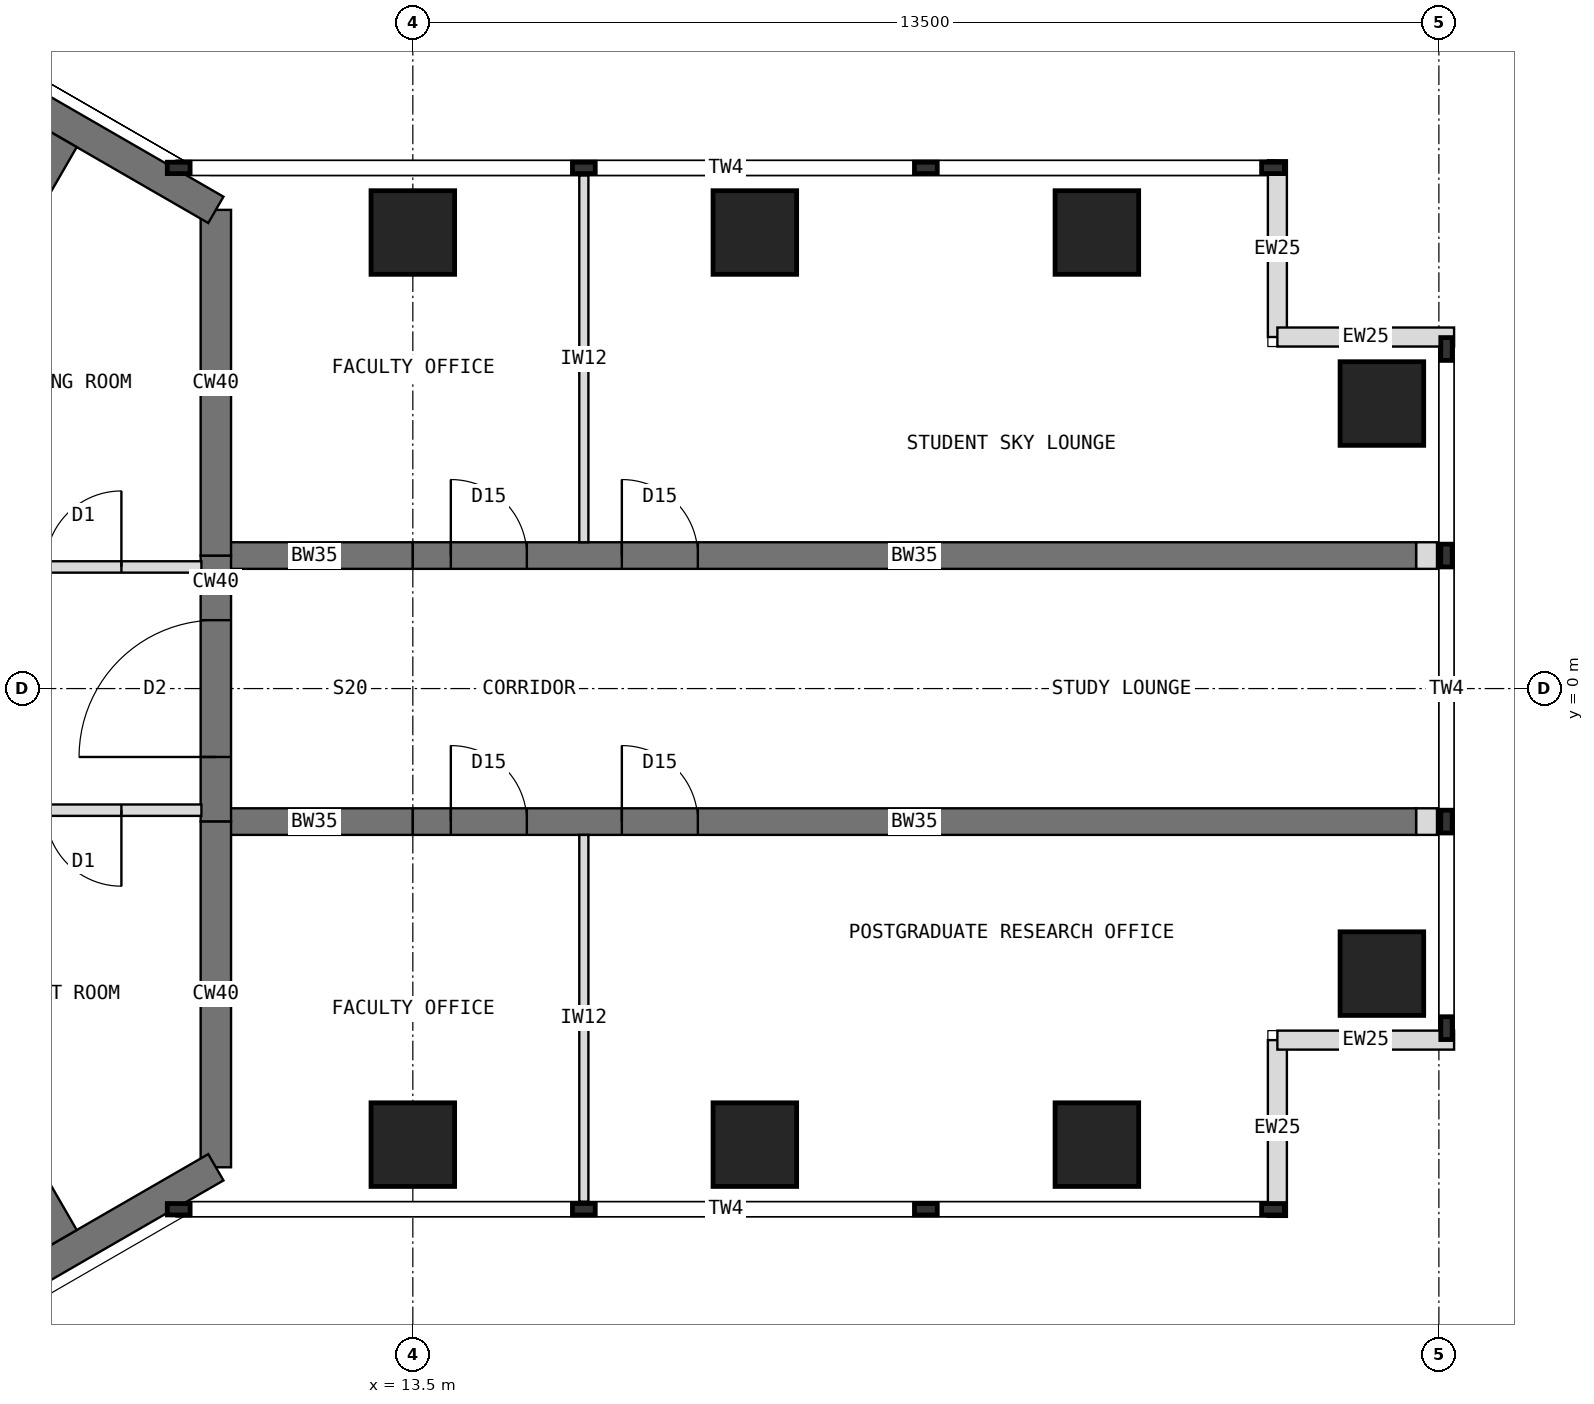
"""IFC4 building model, lengths in metres.
Left out: names, types, materials, properties, quantities, classifications, styles, units other than length and angle.
Written with IfcOpenShell. Run it as: python <this file> out.ifc"""

import sys

from ifc_helpers import new_model, si_unit, direction, frame, frame_2d, origin, origin_2d, place, context, subcontext, project, spatial, rectangle, extrude, element, fill, save


model = new_model("IFC4")
c1 = context("Model", 3, precision=1e-05, world=origin(), true_north=direction((0.0, 1.0)))
c2 = subcontext(c1, "Body", "Model", "MODEL_VIEW")
j1 = project(units=[si_unit("LENGTHUNIT", "METRE"), si_unit("PLANEANGLEUNIT", "RADIAN")], contexts=[c1])
p1 = place(None, origin())
s1 = spatial("IfcSite", under=j1, at=p1, CompositionType="ELEMENT")
p2 = place(p1, origin())
s2 = spatial("IfcBuilding", under=s1, at=p2, CompositionType="ELEMENT")
p3 = place(p2, frame((0.0, 0.0, 243.5)))
s3 = spatial("IfcBuildingStorey", under=s2, at=p3, CompositionType="ELEMENT", Elevation=243.5)
p4 = place(p3, frame((10.908, -6.298, 0.0), z_axis=(0.0, 0.0, 1.0), x_axis=(0.0, 1.0, 0.0)))
e1 = element("IfcWall", 1, at=p4, inside=s3, PredefinedType="SHEAR", context=c2, shape_type="SweptSolid", body=[
    extrude(rectangle(XDim=4.548, YDim=0.4, at=frame_2d((2.274, 0.0))), origin(), (0.0, 0.0, 1.0), 4.0),
])
p5 = place(p3, frame((10.908, -1.75, 0.0), z_axis=(0.0, 0.0, 1.0), x_axis=(0.0, 1.0, 0.0)))
e2 = element("IfcWall", 2, at=p5, inside=s3, PredefinedType="SHEAR", context=c2, shape_type="SweptSolid", body=[
    extrude(rectangle(XDim=3.5, YDim=0.4, at=frame_2d((1.75, 0.0))), origin(), (0.0, 0.0, 1.0), 4.0),
])
p6 = place(p5, frame((0.85, 0.0, 0.0)))
e3 = element("IfcOpeningElement", 3, at=p6, cuts=e2, PredefinedType="OPENING", context=c2, shape_type="SweptSolid", body=[
    extrude(rectangle(XDim=1.8, YDim=2.1, at=frame_2d((0.9, 1.05))), frame((0.0, 0.21, 0.0), z_axis=(0.0, -1.0, 0.0), x_axis=(1.0, 0.0, 0.0)), (0.0, 0.0, 1.0), 0.42),
])
p7 = place(p3, frame((10.908, 1.75, 0.0), z_axis=(0.0, 0.0, 1.0), x_axis=(0.0, 1.0, 0.0)))
e4 = element("IfcWall", 4, at=p7, inside=s3, PredefinedType="SHEAR", context=c2, shape_type="SweptSolid", body=[
    extrude(rectangle(XDim=4.548, YDim=0.4, at=frame_2d((2.274, 0.0))), origin(), (0.0, 0.0, 1.0), 4.0),
])
for number, where, z_axis, x_axis in (
    (5, (10.908, 6.298, 0.0), (0.0, 0.0, 1.0), (-0.866, 0.5, 0.0)),
    (6, (0.0, -12.596, 0.0), (0.0, 0.0, 1.0), (0.866, 0.5, 0.0)),
):
    element("IfcWall", number, at=place(p3, frame(where, z_axis=z_axis, x_axis=x_axis)), inside=s3, PredefinedType="SHEAR", context=c2, shape_type="SweptSolid", body=[
        extrude(rectangle(XDim=12.596, YDim=0.4, at=frame_2d((6.298, 0.0))), origin(), (0.0, 0.0, 1.0), 4.0),
    ])
p8 = place(p3, frame((10.908, 1.75, 0.0), z_axis=(0.0, 0.0, 1.0), x_axis=(1.0, 0.0, 0.0)))
e7 = element("IfcWall", 7, at=p8, inside=s3, PredefinedType="SHEAR", context=c2, shape_type="SweptSolid", body=[
    extrude(rectangle(XDim=2.592, YDim=0.35, at=frame_2d((1.296, 0.0))), origin(), (0.0, 0.0, 1.0), 4.0),
])
p9 = place(p3, frame((13.5, 1.75, 0.0), z_axis=(0.0, 0.0, 1.0), x_axis=(1.0, 0.0, 0.0)))
e8 = element("IfcWall", 8, at=p9, inside=s3, PredefinedType="SHEAR", context=c2, shape_type="SweptSolid", body=[
    extrude(rectangle(XDim=13.2, YDim=0.35, at=frame_2d((6.6, 0.0))), origin(), (0.0, 0.0, 1.0), 4.0),
])
p10 = place(p9, frame((0.5, 0.0, 0.0)))
e9 = element("IfcOpeningElement", 9, at=p10, cuts=e8, PredefinedType="OPENING", context=c2, shape_type="SweptSolid", body=[
    extrude(rectangle(XDim=1.0, YDim=2.1, at=frame_2d((0.5, 1.05))), frame((0.0, 0.185, 0.0), z_axis=(0.0, -1.0, 0.0), x_axis=(1.0, 0.0, 0.0)), (0.0, 0.0, 1.0), 0.37),
])
p11 = place(p9, frame((2.75, 0.0, 0.0)))
e10 = element("IfcOpeningElement", 10, at=p11, cuts=e8, PredefinedType="OPENING", context=c2, shape_type="SweptSolid", body=[
    extrude(rectangle(XDim=1.0, YDim=2.1, at=frame_2d((0.5, 1.05))), frame((0.0, 0.185, 0.0), z_axis=(0.0, -1.0, 0.0), x_axis=(1.0, 0.0, 0.0)), (0.0, 0.0, 1.0), 0.37),
])
p12 = place(p3, frame((10.908, -1.75, 0.0), z_axis=(0.0, 0.0, 1.0), x_axis=(1.0, 0.0, 0.0)))
e11 = element("IfcWall", 11, at=p12, inside=s3, PredefinedType="SHEAR", context=c2, shape_type="SweptSolid", body=[
    extrude(rectangle(XDim=2.592, YDim=0.35, at=frame_2d((1.296, 0.0))), origin(), (0.0, 0.0, 1.0), 4.0),
])
p13 = place(p3, frame((13.5, -1.75, 0.0), z_axis=(0.0, 0.0, 1.0), x_axis=(1.0, 0.0, 0.0)))
e12 = element("IfcWall", 12, at=p13, inside=s3, PredefinedType="SHEAR", context=c2, shape_type="SweptSolid", body=[
    extrude(rectangle(XDim=13.2, YDim=0.35, at=frame_2d((6.6, 0.0))), origin(), (0.0, 0.0, 1.0), 4.0),
])
p14 = place(p13, frame((0.5, 0.0, 0.0)))
e13 = element("IfcOpeningElement", 13, at=p14, cuts=e12, PredefinedType="OPENING", context=c2, shape_type="SweptSolid", body=[
    extrude(rectangle(XDim=1.0, YDim=2.1, at=frame_2d((0.5, 1.05))), frame((0.0, 0.185, 0.0), z_axis=(0.0, -1.0, 0.0), x_axis=(1.0, 0.0, 0.0)), (0.0, 0.0, 1.0), 0.37),
])
p15 = place(p13, frame((2.75, 0.0, 0.0)))
e14 = element("IfcOpeningElement", 14, at=p15, cuts=e12, PredefinedType="OPENING", context=c2, shape_type="SweptSolid", body=[
    extrude(rectangle(XDim=1.0, YDim=2.1, at=frame_2d((0.5, 1.05))), frame((0.0, 0.185, 0.0), z_axis=(0.0, -1.0, 0.0), x_axis=(1.0, 0.0, 0.0)), (0.0, 0.0, 1.0), 0.37),
])
for number, where, z_axis, x_axis in (
    (15, (13.5, 6.0, 0.0), (0.0, 0.0, 1.0), (1.0, 0.0, 0.0)),
    (16, (13.5, -6.0, 0.0), (0.0, 0.0, 1.0), (1.0, 0.0, 0.0)),
    (17, (18.0, 6.0, 0.0), (0.0, 0.0, 1.0), (1.0, 0.0, 0.0)),
    (18, (18.0, -6.0, 0.0), (0.0, 0.0, 1.0), (1.0, 0.0, 0.0)),
    (19, (22.5, 6.0, 0.0), (0.0, 0.0, 1.0), (1.0, 0.0, 0.0)),
    (20, (22.5, -6.0, 0.0), (0.0, 0.0, 1.0), (1.0, 0.0, 0.0)),
    (21, (26.25, 3.75, 0.0), (0.0, 0.0, 1.0), (1.0, 0.0, 0.0)),
    (22, (26.25, -3.75, 0.0), (0.0, 0.0, 1.0), (1.0, 0.0, 0.0)),
):
    element("IfcColumn", number, at=place(p3, frame(where, z_axis=z_axis, x_axis=x_axis)), inside=s3, PredefinedType="COLUMN", context=c2, shape_type="SweptSolid", body=[
        extrude(rectangle(XDim=1.1, YDim=1.1, at=origin_2d()), origin(), (0.0, 0.0, 1.0), 4.0),
    ])
for number, where, z_axis, x_axis in (
    (23, (24.875, 6.95, 0.0), (0.0, 0.0, 1.0), (0.0, -1.0, 0.0)),
    (24, (24.875, 4.625, 0.0), (0.0, 0.0, 1.0), (1.0, 0.0, 0.0)),
    (25, (24.875, -6.95, 0.0), (0.0, 0.0, 1.0), (0.0, 1.0, 0.0)),
    (26, (24.875, -4.625, 0.0), (0.0, 0.0, 1.0), (1.0, 0.0, 0.0)),
):
    element("IfcWall", number, at=place(p3, frame(where, z_axis=z_axis, x_axis=x_axis)), inside=s3, PredefinedType="STANDARD", context=c2, shape_type="SweptSolid", body=[
        extrude(rectangle(XDim=2.325, YDim=0.25, at=frame_2d((1.163, 0.0))), origin(), (0.0, 0.0, 1.0), 3.8),
    ])
for number, where, z_axis, x_axis in (
    (27, (26.7, 1.75, 0.0), (0.0, 0.0, 1.0), (1.0, 0.0, 0.0)),
    (28, (26.7, -1.75, 0.0), (0.0, 0.0, 1.0), (1.0, 0.0, 0.0)),
):
    element("IfcWall", number, at=place(p3, frame(where, z_axis=z_axis, x_axis=x_axis)), inside=s3, PredefinedType="PARTITIONING", context=c2, shape_type="SweptSolid", body=[
        extrude(rectangle(XDim=0.275, YDim=0.35, at=frame_2d((0.138, 0.0))), origin(), (0.0, 0.0, 1.0), 3.8),
    ])
for number, where, z_axis, x_axis in (
    (29, (5.901, 2.02, 0.0), (0.0, 0.0, 1.0), (0.5, 0.866, 0.0)),
    (30, (5.901, -2.02, 0.0), (0.0, 0.0, 1.0), (0.5, -0.866, 0.0)),
):
    element("IfcWall", number, at=place(p3, frame(where, z_axis=z_axis, x_axis=x_axis)), inside=s3, PredefinedType="SHEAR", context=c2, shape_type="SweptSolid", body=[
        extrude(rectangle(XDim=6.008, YDim=0.4, at=frame_2d((3.004, 0.0))), origin(), (0.0, 0.0, 1.0), 4.0),
    ])
for number, where, z_axis, x_axis in (
    (31, (15.75, 1.925, 0.0), (0.0, 0.0, 1.0), (0.0, 1.0, 0.0)),
    (32, (15.75, -1.925, 0.0), (0.0, 0.0, 1.0), (0.0, -1.0, 0.0)),
):
    element("IfcWall", number, at=place(p3, frame(where, z_axis=z_axis, x_axis=x_axis)), inside=s3, PredefinedType="PARTITIONING", context=c2, shape_type="SweptSolid", body=[
        extrude(rectangle(XDim=4.825, YDim=0.12, at=frame_2d((2.413, 0.0))), origin(), (0.0, 0.0, 1.0), 3.8),
    ])
p16 = place(p3, frame((5.523, 1.6, 0.0), z_axis=(0.0, 0.0, 1.0), x_axis=(1.0, 0.0, 0.0)))
e33 = element("IfcWall", 33, at=p16, inside=s3, PredefinedType="PARTITIONING", context=c2, shape_type="SweptSolid", body=[
    extrude(rectangle(XDim=5.196, YDim=0.15, at=frame_2d((2.598, 0.0))), origin(), (0.0, 0.0, 1.0), 3.8),
])
p17 = place(p16, frame((3.143, 0.0, 0.0)))
e34 = element("IfcOpeningElement", 34, at=p17, cuts=e33, PredefinedType="OPENING", context=c2, shape_type="SweptSolid", body=[
    extrude(rectangle(XDim=1.0, YDim=2.1, at=frame_2d((0.5, 1.05))), frame((0.0, 0.085, 0.0), z_axis=(0.0, -1.0, 0.0), x_axis=(1.0, 0.0, 0.0)), (0.0, 0.0, 1.0), 0.17),
])
p18 = place(p3, frame((10.718, -1.6, 0.0), z_axis=(0.0, 0.0, 1.0), x_axis=(-1.0, 0.0, 0.0)))
e35 = element("IfcWall", 35, at=p18, inside=s3, PredefinedType="PARTITIONING", context=c2, shape_type="SweptSolid", body=[
    extrude(rectangle(XDim=5.196, YDim=0.15, at=frame_2d((2.598, 0.0))), origin(), (0.0, 0.0, 1.0), 3.8),
])
p19 = place(p18, frame((1.053, 0.0, 0.0)))
e36 = element("IfcOpeningElement", 36, at=p19, cuts=e35, PredefinedType="OPENING", context=c2, shape_type="SweptSolid", body=[
    extrude(rectangle(XDim=1.0, YDim=2.1, at=frame_2d((0.5, 1.05))), frame((0.0, 0.085, 0.0), z_axis=(0.0, -1.0, 0.0), x_axis=(1.0, 0.0, 0.0)), (0.0, 0.0, 1.0), 0.17),
])
p20 = place(p6, origin())
e37 = element("IfcDoor", 37, at=p20, inside=s3, OperationType="DOUBLE_DOOR_DOUBLE_SWING", PredefinedType="DOOR", context=c2, shape_type="SweptSolid", body=[
    extrude(rectangle(XDim=1.8, YDim=2.1, at=frame_2d((0.9, 1.05))), frame((0.0, 0.025, 0.0), z_axis=(0.0, -1.0, 0.0), x_axis=(1.0, 0.0, 0.0)), (0.0, 0.0, 1.0), 0.05),
])
fill(e3, e37)
p21 = place(p19, origin())
e38 = element("IfcDoor", 38, at=p21, inside=s3, OperationType="SINGLE_SWING_LEFT", PredefinedType="DOOR", context=c2, shape_type="SweptSolid", body=[
    extrude(rectangle(XDim=1.0, YDim=2.1, at=frame_2d((0.5, 1.05))), frame((0.0, 0.025, 0.0), z_axis=(0.0, -1.0, 0.0), x_axis=(1.0, 0.0, 0.0)), (0.0, 0.0, 1.0), 0.05),
])
fill(e36, e38)
p22 = place(p17, origin())
e39 = element("IfcDoor", 39, at=p22, inside=s3, OperationType="SINGLE_SWING_RIGHT", PredefinedType="DOOR", context=c2, shape_type="SweptSolid", body=[
    extrude(rectangle(XDim=1.0, YDim=2.1, at=frame_2d((0.5, 1.05))), frame((0.0, 0.025, 0.0), z_axis=(0.0, -1.0, 0.0), x_axis=(1.0, 0.0, 0.0)), (0.0, 0.0, 1.0), 0.05),
])
fill(e34, e39)
p23 = place(p10, origin())
e40 = element("IfcDoor", 40, at=p23, inside=s3, OperationType="SINGLE_SWING_LEFT", PredefinedType="DOOR", context=c2, shape_type="SweptSolid", body=[
    extrude(rectangle(XDim=1.0, YDim=2.1, at=frame_2d((0.5, 1.05))), frame((0.0, 0.025, 0.0), z_axis=(0.0, -1.0, 0.0), x_axis=(1.0, 0.0, 0.0)), (0.0, 0.0, 1.0), 0.05),
])
fill(e9, e40)
p24 = place(p11, origin())
e41 = element("IfcDoor", 41, at=p24, inside=s3, OperationType="SINGLE_SWING_LEFT", PredefinedType="DOOR", context=c2, shape_type="SweptSolid", body=[
    extrude(rectangle(XDim=1.0, YDim=2.1, at=frame_2d((0.5, 1.05))), frame((0.0, 0.025, 0.0), z_axis=(0.0, -1.0, 0.0), x_axis=(1.0, 0.0, 0.0)), (0.0, 0.0, 1.0), 0.05),
])
fill(e10, e41)
p25 = place(p14, origin())
e42 = element("IfcDoor", 42, at=p25, inside=s3, OperationType="SINGLE_SWING_LEFT", PredefinedType="DOOR", context=c2, shape_type="SweptSolid", body=[
    extrude(rectangle(XDim=1.0, YDim=2.1, at=frame_2d((0.5, 1.05))), frame((0.0, 0.025, 0.0), z_axis=(0.0, -1.0, 0.0), x_axis=(1.0, 0.0, 0.0)), (0.0, 0.0, 1.0), 0.05),
])
fill(e13, e42)
p26 = place(p15, origin())
e43 = element("IfcDoor", 43, at=p26, inside=s3, OperationType="SINGLE_SWING_LEFT", PredefinedType="DOOR", context=c2, shape_type="SweptSolid", body=[
    extrude(rectangle(XDim=1.0, YDim=2.1, at=frame_2d((0.5, 1.05))), frame((0.0, 0.025, 0.0), z_axis=(0.0, -1.0, 0.0), x_axis=(1.0, 0.0, 0.0)), (0.0, 0.0, 1.0), 0.05),
])
fill(e14, e43)
save(model, sys.argv[1])
